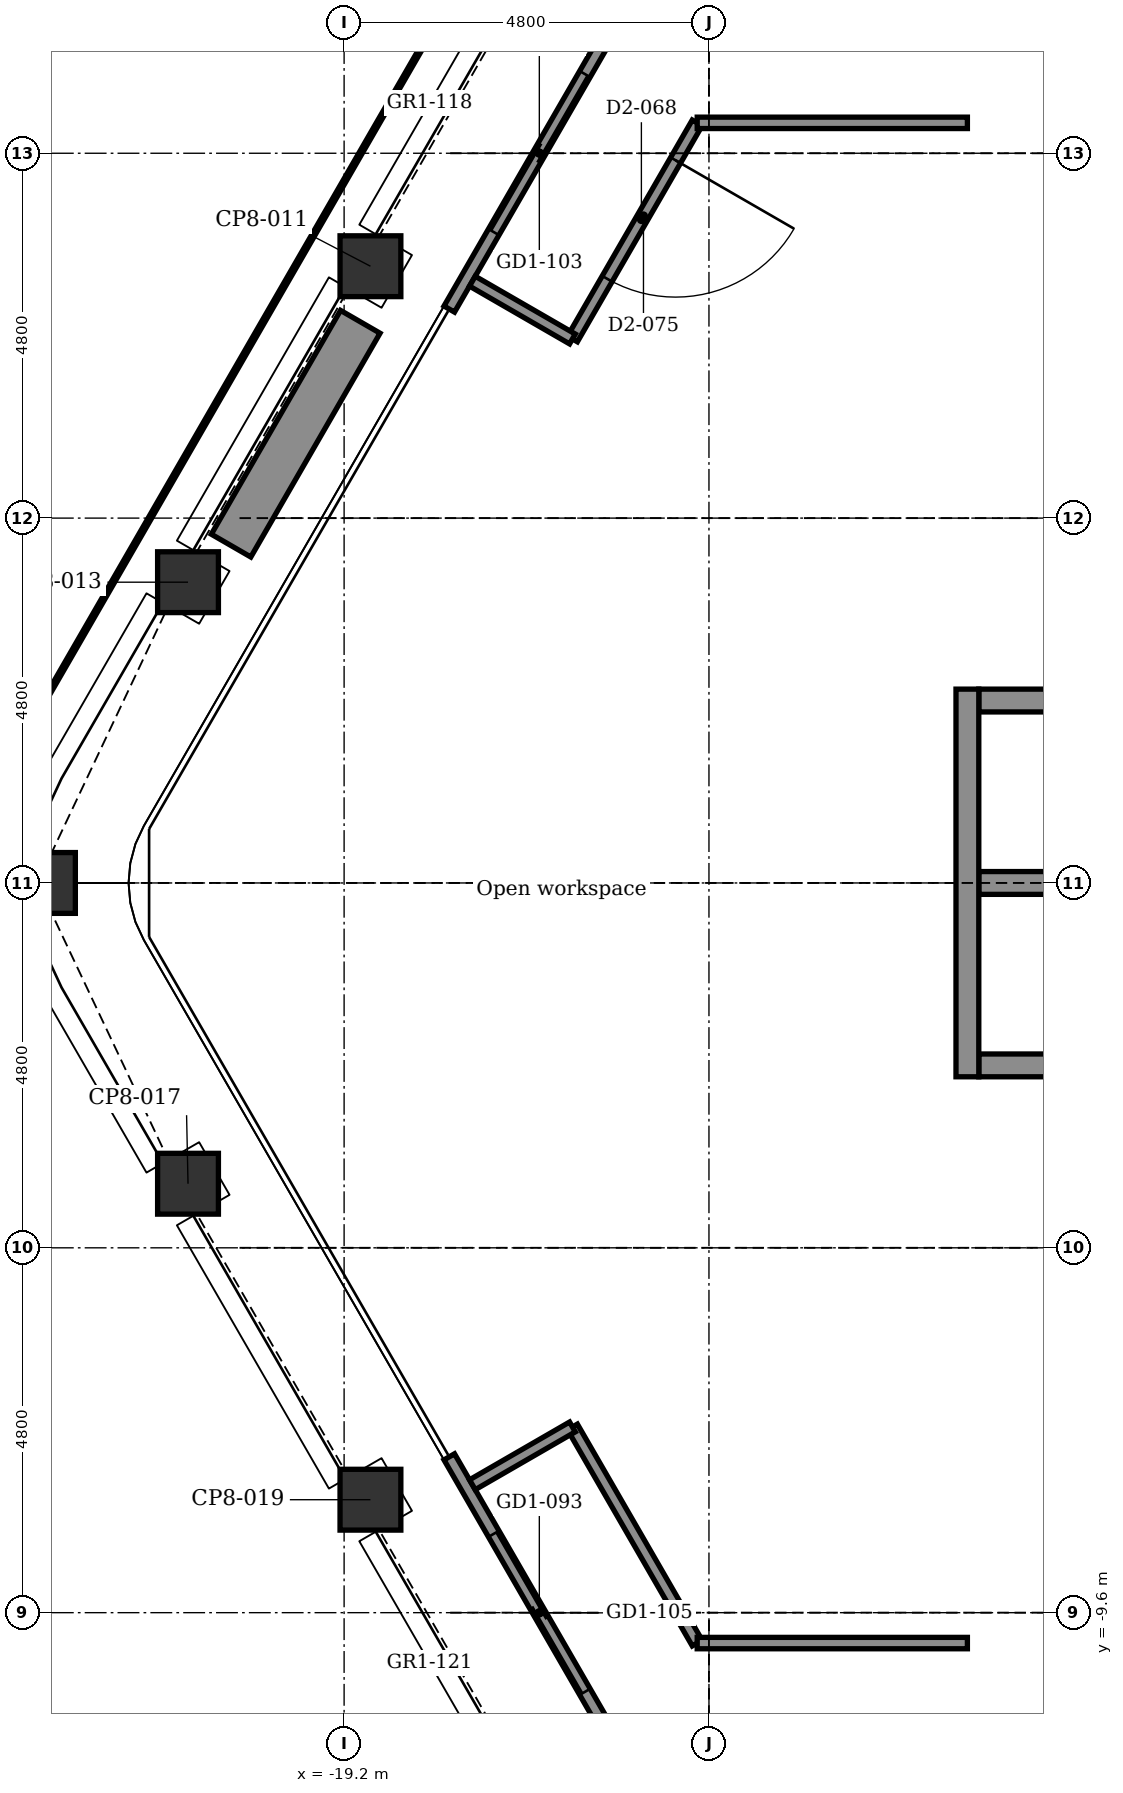
"""IFC4 building model, lengths in metres.
Left out: names, types, materials, properties, quantities, classifications, styles, units other than length and angle.
Written with IfcOpenShell. Run it as: python <this file> out.ifc"""

import sys

from ifc_helpers import new_model, si_unit, direction, frame, frame_2d, origin, origin_2d, place, context, subcontext, project, spatial, rectangle, extrude, element, fill, save


model = new_model("IFC4")
c1 = context("Model", 3, precision=1e-05, world=origin(), true_north=direction((0.0, 1.0)))
c2 = subcontext(c1, "Body", "Model", "MODEL_VIEW")
j1 = project(units=[si_unit("LENGTHUNIT", "METRE"), si_unit("PLANEANGLEUNIT", "RADIAN")], contexts=[c1])
p1 = place(None, origin())
s1 = spatial("IfcSite", under=j1, at=p1, CompositionType="ELEMENT")
p2 = place(p1, origin())
s2 = spatial("IfcBuilding", under=s1, at=p2, CompositionType="ELEMENT")
p3 = place(p2, frame((0.0, 0.0, 273.5)))
s3 = spatial("IfcBuildingStorey", under=s2, at=p3, CompositionType="ELEMENT", Elevation=273.5)
for number, where, z_axis, x_axis in (
    (1, (-18.854, -8.114, -0.15), (0.0, 0.0, 1.0), (0.866, 0.5, 0.0)),
    (2, (-21.254, -3.957, -0.15), (0.0, 0.0, 1.0), (0.866, 0.5, 0.0)),
    (3, (-23.136, 0.0, -0.15), (0.0, 0.0, 1.0), (1.0, 0.0, 0.0)),
    (4, (-21.254, 3.957, -0.15), (0.0, 0.0, 1.0), (0.5, 0.866, 0.0)),
    (5, (-18.854, 8.114, -0.15), (0.0, 0.0, 1.0), (0.5, 0.866, 0.0)),
):
    element("IfcColumn", number, at=place(p3, frame(where, z_axis=z_axis, x_axis=x_axis)), inside=s3, PredefinedType="COLUMN", context=c2, shape_type="SweptSolid", body=[
        extrude(rectangle(XDim=0.8, YDim=0.8, at=origin_2d()), origin(), (0.0, 0.0, 1.0), 3.9),
    ])
p4 = place(p3, frame((-10.85, -2.4, -0.15), z_axis=(0.0, 0.0, 1.0), x_axis=(1.0, 0.0, 0.0)))
e6 = element("IfcWall", 6, at=p4, inside=s3, PredefinedType="STANDARD", context=c2, shape_type="SweptSolid", body=[
    extrude(rectangle(XDim=1.1, YDim=0.3, at=frame_2d((0.55, 0.0))), origin(), (0.0, 0.0, 1.0), 3.9),
])
p5 = place(p3, frame((-10.85, 0.0, -0.15), z_axis=(0.0, 0.0, 1.0), x_axis=(1.0, 0.0, 0.0)))
e7 = element("IfcWall", 7, at=p5, inside=s3, PredefinedType="STANDARD", context=c2, shape_type="SweptSolid", body=[
    extrude(rectangle(XDim=3.3, YDim=0.3, at=frame_2d((1.65, 0.0))), origin(), (0.0, 0.0, 1.0), 3.9),
])
p6 = place(p3, frame((-10.85, 2.4, -0.15), z_axis=(0.0, 0.0, 1.0), x_axis=(1.0, 0.0, 0.0)))
e8 = element("IfcWall", 8, at=p6, inside=s3, PredefinedType="STANDARD", context=c2, shape_type="SweptSolid", body=[
    extrude(rectangle(XDim=1.1, YDim=0.3, at=frame_2d((0.55, 0.0))), origin(), (0.0, 0.0, 1.0), 3.9),
])
p7 = place(p3, frame((-11.0, -2.55, -0.15), z_axis=(0.0, 0.0, 1.0), x_axis=(0.0, 1.0, 0.0)))
e9 = element("IfcWall", 9, at=p7, inside=s3, PredefinedType="STANDARD", context=c2, shape_type="SweptSolid", body=[
    extrude(rectangle(XDim=5.1, YDim=0.3, at=frame_2d((2.55, 0.0))), origin(), (0.0, 0.0, 1.0), 3.9),
])
p8 = place(p3, frame((-15.447, -11.655, 0.0), z_axis=(0.0, 0.0, 1.0), x_axis=(-0.499978080042, 0.866038058908, 0.0)))
e10 = element("IfcWall", 10, at=p8, inside=s3, PredefinedType="PARTITIONING", context=c2, shape_type="SweptSolid", body=[
    extrude(rectangle(XDim=4.74, YDim=0.16, at=frame_2d((2.37, 0.0))), origin(), (0.0, 0.0, 1.0), 3.75),
])
p9 = place(p8, frame((1.17, 0.0, 0.0)))
e11 = element("IfcOpeningElement", 11, at=p9, cuts=e10, PredefinedType="OPENING", context=c2, shape_type="SweptSolid", body=[
    extrude(rectangle(XDim=2.4, YDim=2.4, at=frame_2d((1.2, 1.2))), frame((0.0, 0.09, 0.0), z_axis=(0.0, -1.0, 0.0), x_axis=(1.0, 0.0, 0.0)), (0.0, 0.0, 1.0), 0.18),
])
p10 = place(p3, frame((-17.817, 7.55, 0.0), z_axis=(0.0, 0.0, 1.0), x_axis=(0.499978080042, 0.866038058908, 0.0)))
e12 = element("IfcWall", 12, at=p10, inside=s3, PredefinedType="PARTITIONING", context=c2, shape_type="SweptSolid", body=[
    extrude(rectangle(XDim=4.74, YDim=0.16, at=frame_2d((2.37, 0.0))), origin(), (0.0, 0.0, 1.0), 3.75),
])
p11 = place(p10, frame((1.17, 0.0, 0.0)))
e13 = element("IfcOpeningElement", 13, at=p11, cuts=e12, PredefinedType="OPENING", context=c2, shape_type="SweptSolid", body=[
    extrude(rectangle(XDim=2.4, YDim=2.4, at=frame_2d((1.2, 1.2))), frame((0.0, 0.09, 0.0), z_axis=(0.0, -1.0, 0.0), x_axis=(1.0, 0.0, 0.0)), (0.0, 0.0, 1.0), 0.18),
])
p12 = place(p3, frame((-20.687, 4.438, 0.0), z_axis=(0.0, 0.0, 1.0), x_axis=(0.500008388397, 0.866020560687, 0.0)))
e14 = element("IfcWall", 14, at=p12, inside=s3, PredefinedType="USERDEFINED", context=c2, shape_type="SweptSolid", body=[
    extrude(rectangle(XDim=3.4, YDim=0.6, at=frame_2d((1.7, 0.0))), origin(), (0.0, 0.0, 1.0), 0.7),
])
p13 = place(p3, frame((-16.196, -7.157, 0.0), z_axis=(0.0, 0.0, 1.0), x_axis=(0.499954196102, -0.866051847062, 0.0)))
e15 = element("IfcWall", 15, at=p13, inside=s3, PredefinedType="PARTITIONING", context=c2, shape_type="SweptSolid", body=[
    extrude(rectangle(XDim=3.283, YDim=0.15, at=frame_2d((1.642, 0.0))), origin(), (0.0, 0.0, 1.0), 3.75),
])
p14 = place(p3, frame((-16.196, 7.157, 0.0), z_axis=(0.0, 0.0, 1.0), x_axis=(0.499954196102, 0.866051847062, 0.0)))
e16 = element("IfcWall", 16, at=p14, inside=s3, PredefinedType="PARTITIONING", context=c2, shape_type="SweptSolid", body=[
    extrude(rectangle(XDim=3.283, YDim=0.15, at=frame_2d((1.642, 0.0))), origin(), (0.0, 0.0, 1.0), 3.75),
])
p15 = place(p14, frame((0.914, 0.0, 0.0)))
e17 = element("IfcOpeningElement", 17, at=p15, cuts=e16, PredefinedType="OPENING", context=c2, shape_type="SweptSolid", body=[
    extrude(rectangle(XDim=1.8, YDim=2.1, at=frame_2d((0.9, 1.05))), frame((0.0, 0.085, 0.0), z_axis=(0.0, -1.0, 0.0), x_axis=(1.0, 0.0, 0.0)), (0.0, 0.0, 1.0), 0.17),
])
for number, where, z_axis, x_axis in (
    (18, (-17.512, 7.917, 0.0), (0.0, 0.0, 1.0), (0.866, -0.5, 0.0)),
    (19, (-17.512, -7.917, 0.0), (0.0, 0.0, 1.0), (0.866, 0.5, 0.0)),
):
    element("IfcWall", number, at=place(p3, frame(where, z_axis=z_axis, x_axis=x_axis)), inside=s3, PredefinedType="PARTITIONING", context=c2, shape_type="SweptSolid", body=[
        extrude(rectangle(XDim=1.52, YDim=0.15, at=frame_2d((0.76, 0.0))), origin(), (0.0, 0.0, 1.0), 3.75),
    ])
for number, where, z_axis, x_axis in (
    (20, (-14.555, -10.0, 0.0), (0.0, 0.0, 1.0), (1.0, 0.0, 0.0)),
    (21, (-14.555, 10.0, 0.0), (0.0, 0.0, 1.0), (1.0, 0.0, 0.0)),
):
    element("IfcWall", number, at=place(p3, frame(where, z_axis=z_axis, x_axis=x_axis)), inside=s3, PredefinedType="PARTITIONING", context=c2, shape_type="SweptSolid", body=[
        extrude(rectangle(XDim=3.555, YDim=0.15, at=frame_2d((1.777, 0.0))), origin(), (0.0, 0.0, 1.0), 3.75),
    ])
p16 = place(p9, origin())
e22 = element("IfcDoor", 22, at=p16, inside=s3, OperationType="DOUBLE_DOOR_SLIDING", PredefinedType="DOOR", context=c2, shape_type="SweptSolid", body=[
    extrude(rectangle(XDim=2.4, YDim=2.4, at=frame_2d((1.2, 1.2))), frame((0.0, 0.025, 0.0), z_axis=(0.0, -1.0, 0.0), x_axis=(1.0, 0.0, 0.0)), (0.0, 0.0, 1.0), 0.05),
])
fill(e11, e22)
p17 = place(p11, origin())
e23 = element("IfcDoor", 23, at=p17, inside=s3, OperationType="DOUBLE_DOOR_SLIDING", PredefinedType="DOOR", context=c2, shape_type="SweptSolid", body=[
    extrude(rectangle(XDim=2.4, YDim=2.4, at=frame_2d((1.2, 1.2))), frame((0.0, 0.025, 0.0), z_axis=(0.0, -1.0, 0.0), x_axis=(1.0, 0.0, 0.0)), (0.0, 0.0, 1.0), 0.05),
])
fill(e13, e23)
p18 = place(p15, frame((1.8, 0.0, 0.0), z_axis=(0.0, 0.0, 1.0), x_axis=(-1.0, 0.0, 0.0)))
e24 = element("IfcDoor", 24, at=p18, inside=s3, OperationType="SINGLE_SWING_RIGHT", PredefinedType="DOOR", context=c2, shape_type="SweptSolid", body=[
    extrude(rectangle(XDim=1.8, YDim=2.1, at=frame_2d((0.9, 1.05))), frame((0.0, 0.025, 0.0), z_axis=(0.0, -1.0, 0.0), x_axis=(1.0, 0.0, 0.0)), (0.0, 0.0, 1.0), 0.05),
])
fill(e17, e24)
save(model, sys.argv[1])
